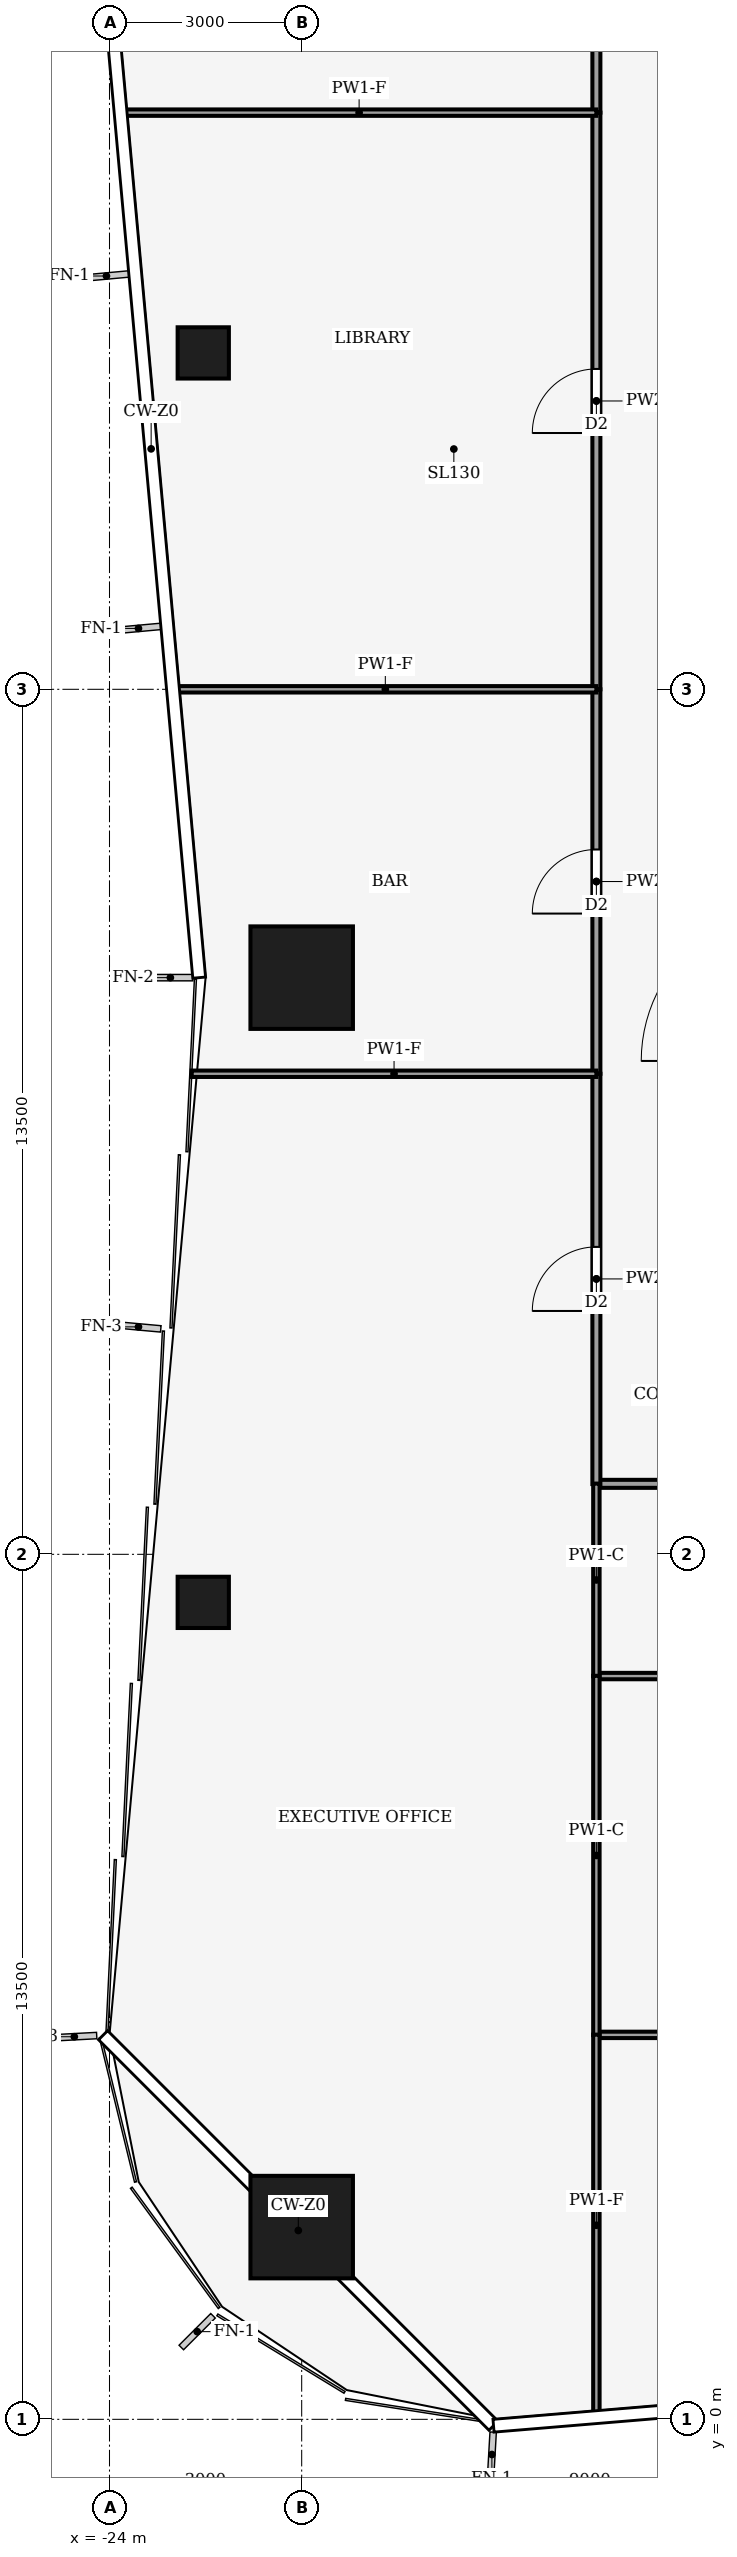
"""IFC4 building model, lengths in metres.
Left out: names, types, materials, properties, quantities, classifications, styles, units other than length and angle.
Written with IfcOpenShell. Run it as: python <this file> out.ifc"""

import sys

from ifc_helpers import new_model, si_unit, direction, frame, frame_2d, origin, origin_2d, place, context, subcontext, project, spatial, rectangle, hollow_rectangle, extrude, element, fill, save


model = new_model("IFC4")
c1 = context("Model", 3, precision=1e-05, world=origin(), true_north=direction((0.0, 1.0)))
c2 = subcontext(c1, "Body", "Model", "MODEL_VIEW")
j1 = project(units=[si_unit("LENGTHUNIT", "METRE"), si_unit("PLANEANGLEUNIT", "RADIAN")], contexts=[c1])
p1 = place(None, origin())
s1 = spatial("IfcSite", under=j1, at=p1, CompositionType="ELEMENT")
p2 = place(p1, origin())
s2 = spatial("IfcBuilding", under=s1, at=p2, CompositionType="ELEMENT")
p3 = place(p2, frame((0.0, 0.0, 14.0)))
s3 = spatial("IfcBuildingStorey", under=s2, at=p3, CompositionType="ELEMENT", Elevation=14.0)
for number, where, z_axis, x_axis in (
    (1, (-21.0, 3.0, 0.0), (0.0, 0.0, 1.0), (1.0, 0.0, 0.0)),
    (2, (-21.0, 22.5, 0.0), (0.0, 0.0, 1.0), (1.0, 0.0, 0.0)),
):
    element("IfcColumn", number, at=place(p3, frame(where, z_axis=z_axis, x_axis=x_axis)), inside=s3, PredefinedType="COLUMN", context=c2, shape_type="SweptSolid", body=[
        extrude(hollow_rectangle(XDim=1.6, YDim=1.6, WallThickness=0.09, at=origin_2d()), origin(), (0.0, 0.0, 1.0), 4.0),
    ])
for number, where, z_axis, x_axis in (
    (3, (-22.536, 12.75, 0.0), (0.0, 0.0, 1.0), (1.0, 0.0, 0.0)),
    (4, (-22.536, 32.25, 0.0), (0.0, 0.0, 1.0), (1.0, 0.0, 0.0)),
):
    element("IfcColumn", number, at=place(p3, frame(where, z_axis=z_axis, x_axis=x_axis)), inside=s3, PredefinedType="COLUMN", context=c2, shape_type="SweptSolid", body=[
        extrude(hollow_rectangle(XDim=0.8, YDim=0.8, WallThickness=0.04, at=origin_2d()), origin(), (0.0, 0.0, 1.0), 4.0),
    ])
p4 = place(p3, frame((-9.0, 14.6, 0.0), z_axis=(0.0, 0.0, 1.0), x_axis=(-1.0, 0.0, 0.0)))
e5 = element("IfcWall", 5, at=p4, inside=s3, PredefinedType="PARTITIONING", context=c2, shape_type="SweptSolid", body=[
    extrude(rectangle(XDim=7.4, YDim=0.125, at=frame_2d((3.7, 0.0))), origin(), (0.0, 0.0, 1.0), 3.29),
])
p5 = place(p4, frame((3.2, 0.0, 0.0)))
e6 = element("IfcOpeningElement", 6, at=p5, cuts=e5, PredefinedType="OPENING", context=c2, shape_type="SweptSolid", body=[
    extrude(rectangle(XDim=1.0, YDim=2.1, at=frame_2d((0.5, 1.05))), frame((0.0, 0.073, 0.0), z_axis=(0.0, -1.0, 0.0), x_axis=(1.0, 0.0, 0.0)), (0.0, 0.0, 1.0), 0.145),
])
p6 = place(p3, frame((-16.4, 14.596, 0.0), z_axis=(0.0, 0.0, 1.0), x_axis=(0.0, 1.0, 0.0)))
e7 = element("IfcWall", 7, at=p6, inside=s3, PredefinedType="PARTITIONING", context=c2, shape_type="SweptSolid", body=[
    extrude(rectangle(XDim=6.404, YDim=0.125, at=frame_2d((3.202, 0.0))), origin(), (0.0, 0.0, 1.0), 3.14),
])
p7 = place(p6, frame((2.702, 0.0, 0.0)))
e8 = element("IfcOpeningElement", 8, at=p7, cuts=e7, PredefinedType="OPENING", context=c2, shape_type="SweptSolid", body=[
    extrude(rectangle(XDim=1.0, YDim=2.1, at=frame_2d((0.5, 1.05))), frame((0.0, 0.073, 0.0), z_axis=(0.0, -1.0, 0.0), x_axis=(1.0, 0.0, 0.0)), (0.0, 0.0, 1.0), 0.145),
])
p8 = place(p3, frame((-16.4, 21.0, 0.0), z_axis=(0.0, 0.0, 1.0), x_axis=(0.0, 1.0, 0.0)))
e9 = element("IfcWall", 9, at=p8, inside=s3, PredefinedType="PARTITIONING", context=c2, shape_type="SweptSolid", body=[
    extrude(rectangle(XDim=6.0, YDim=0.125, at=frame_2d((3.0, 0.0))), origin(), (0.0, 0.0, 1.0), 3.54),
])
p9 = place(p8, frame((2.5, 0.0, 0.0)))
e10 = element("IfcOpeningElement", 10, at=p9, cuts=e9, PredefinedType="OPENING", context=c2, shape_type="SweptSolid", body=[
    extrude(rectangle(XDim=1.0, YDim=2.1, at=frame_2d((0.5, 1.05))), frame((0.0, 0.073, 0.0), z_axis=(0.0, -1.0, 0.0), x_axis=(1.0, 0.0, 0.0)), (0.0, 0.0, 1.0), 0.145),
])
p10 = place(p3, frame((-16.4, 27.0, 0.0), z_axis=(0.0, 0.0, 1.0), x_axis=(0.0, 1.0, 0.0)))
e11 = element("IfcWall", 11, at=p10, inside=s3, PredefinedType="PARTITIONING", context=c2, shape_type="SweptSolid", body=[
    extrude(rectangle(XDim=9.0, YDim=0.125, at=frame_2d((4.5, 0.0))), origin(), (0.0, 0.0, 1.0), 3.48),
])
p11 = place(p10, frame((4.0, 0.0, 0.0)))
e12 = element("IfcOpeningElement", 12, at=p11, cuts=e11, PredefinedType="OPENING", context=c2, shape_type="SweptSolid", body=[
    extrude(rectangle(XDim=1.0, YDim=2.1, at=frame_2d((0.5, 1.05))), frame((0.0, 0.073, 0.0), z_axis=(0.0, -1.0, 0.0), x_axis=(1.0, 0.0, 0.0)), (0.0, 0.0, 1.0), 0.145),
])
p12 = place(p3, frame((-16.4, 36.0, 0.0), z_axis=(0.0, 0.0, 1.0), x_axis=(0.0, 1.0, 0.0)))
e13 = element("IfcWall", 13, at=p12, inside=s3, PredefinedType="PARTITIONING", context=c2, shape_type="SweptSolid", body=[
    extrude(rectangle(XDim=5.404, YDim=0.125, at=frame_2d((2.702, 0.0))), origin(), (0.0, 0.0, 1.0), 3.14),
])
p13 = place(p12, frame((1.802, 0.0, 0.0)))
e14 = element("IfcOpeningElement", 14, at=p13, cuts=e13, PredefinedType="OPENING", context=c2, shape_type="SweptSolid", body=[
    extrude(rectangle(XDim=1.0, YDim=2.1, at=frame_2d((0.5, 1.05))), frame((0.0, 0.073, 0.0), z_axis=(0.0, -1.0, 0.0), x_axis=(1.0, 0.0, 0.0)), (0.0, 0.0, 1.0), 0.145),
])
p14 = place(p3, frame((-8.996, 11.6, 0.0), z_axis=(0.0, 0.0, 1.0), x_axis=(-1.0, 0.0, 0.0)))
e15 = element("IfcWall", 15, at=p14, inside=s3, PredefinedType="PARTITIONING", context=c2, shape_type="SweptSolid", body=[
    extrude(rectangle(XDim=7.404, YDim=0.1, at=frame_2d((3.702, 0.0))), origin(), (0.0, 0.0, 1.0), 3.29),
])
p15 = place(p14, frame((2.802, 0.0, 0.0)))
e16 = element("IfcOpeningElement", 16, at=p15, cuts=e15, PredefinedType="OPENING", context=c2, shape_type="SweptSolid", body=[
    extrude(rectangle(XDim=1.8, YDim=2.1, at=frame_2d((0.9, 1.05))), frame((0.0, 0.06, 0.0), z_axis=(0.0, -1.0, 0.0), x_axis=(1.0, 0.0, 0.0)), (0.0, 0.0, 1.0), 0.12),
])
p16 = place(p3, frame((-16.4, 14.604, 0.0), z_axis=(0.0, 0.0, 1.0), x_axis=(0.0, -1.0, 0.0)))
e17 = element("IfcWall", 17, at=p16, inside=s3, PredefinedType="PARTITIONING", context=c2, shape_type="SweptSolid", body=[
    extrude(rectangle(XDim=3.008, YDim=0.1, at=frame_2d((1.504, 0.0))), origin(), (0.0, 0.0, 1.0), 3.87),
])
p17 = place(p3, frame((-3.0, 6.0, 0.0), z_axis=(0.0, 0.0, 1.0), x_axis=(-1.0, 0.0, 0.0)))
e18 = element("IfcWall", 18, at=p17, inside=s3, PredefinedType="PARTITIONING", context=c2, shape_type="SweptSolid", body=[
    extrude(rectangle(XDim=13.4, YDim=0.1, at=frame_2d((6.7, 0.0))), origin(), (0.0, 0.0, 1.0), 3.29),
])
p18 = place(p17, frame((6.2, 0.0, 0.0)))
e19 = element("IfcOpeningElement", 19, at=p18, cuts=e18, PredefinedType="OPENING", context=c2, shape_type="SweptSolid", body=[
    extrude(rectangle(XDim=1.0, YDim=2.1, at=frame_2d((0.5, 1.05))), frame((0.0, 0.06, 0.0), z_axis=(0.0, -1.0, 0.0), x_axis=(1.0, 0.0, 0.0)), (0.0, 0.0, 1.0), 0.12),
])
p19 = place(p3, frame((-16.4, 11.604, 0.0), z_axis=(0.0, 0.0, 1.0), x_axis=(0.0, -1.0, 0.0)))
e20 = element("IfcWall", 20, at=p19, inside=s3, PredefinedType="PARTITIONING", context=c2, shape_type="SweptSolid", body=[
    extrude(rectangle(XDim=5.608, YDim=0.1, at=frame_2d((2.804, 0.0))), origin(), (0.0, 0.0, 1.0), 3.87),
])
p20 = place(p3, frame((-16.4, 6.004, 0.0), z_axis=(0.0, 0.0, 1.0), x_axis=(0.0, -1.0, 0.0)))
e21 = element("IfcWall", 21, at=p20, inside=s3, PredefinedType="PARTITIONING", context=c2, shape_type="SweptSolid", body=[
    extrude(rectangle(XDim=5.951, YDim=0.1, at=frame_2d((2.975, 0.0))), origin(), (0.0, 0.0, 1.0), 3.04),
])
p21 = place(p3, frame((-16.4, 21.0, 0.0), z_axis=(0.0, 0.0, 1.0), x_axis=(-1.0, 0.0, 0.0)))
e22 = element("IfcWall", 22, at=p21, inside=s3, PredefinedType="PARTITIONING", context=c2, shape_type="SweptSolid", body=[
    extrude(rectangle(XDim=6.316, YDim=0.1, at=frame_2d((3.158, 0.0))), origin(), (0.0, 0.0, 1.0), 3.04),
])
p22 = place(p3, frame((-16.4, 27.0, 0.0), z_axis=(0.0, 0.0, 1.0), x_axis=(-1.0, 0.0, 0.0)))
e23 = element("IfcWall", 23, at=p22, inside=s3, PredefinedType="PARTITIONING", context=c2, shape_type="SweptSolid", body=[
    extrude(rectangle(XDim=6.589, YDim=0.1, at=frame_2d((3.294, 0.0))), origin(), (0.0, 0.0, 1.0), 3.04),
])
p23 = place(p3, frame((-16.4, 36.0, 0.0), z_axis=(0.0, 0.0, 1.0), x_axis=(-1.0, 0.0, 0.0)))
e24 = element("IfcWall", 24, at=p23, inside=s3, PredefinedType="PARTITIONING", context=c2, shape_type="SweptSolid", body=[
    extrude(rectangle(XDim=7.407, YDim=0.1, at=frame_2d((3.704, 0.0))), origin(), (0.0, 0.0, 1.0), 3.04),
])
p24 = place(p7, origin())
e25 = element("IfcDoor", 25, at=p24, inside=s3, OperationType="SINGLE_SWING_RIGHT", PredefinedType="DOOR", context=c2, shape_type="SweptSolid", body=[
    extrude(rectangle(XDim=1.0, YDim=2.1, at=frame_2d((0.5, 1.05))), frame((0.0, 0.025, 0.0), z_axis=(0.0, -1.0, 0.0), x_axis=(1.0, 0.0, 0.0)), (0.0, 0.0, 1.0), 0.05),
])
fill(e8, e25)
p25 = place(p9, origin())
e26 = element("IfcDoor", 26, at=p25, inside=s3, OperationType="SINGLE_SWING_LEFT", PredefinedType="DOOR", context=c2, shape_type="SweptSolid", body=[
    extrude(rectangle(XDim=1.0, YDim=2.1, at=frame_2d((0.5, 1.05))), frame((0.0, 0.025, 0.0), z_axis=(0.0, -1.0, 0.0), x_axis=(1.0, 0.0, 0.0)), (0.0, 0.0, 1.0), 0.05),
])
fill(e10, e26)
p26 = place(p11, origin())
e27 = element("IfcDoor", 27, at=p26, inside=s3, OperationType="SINGLE_SWING_RIGHT", PredefinedType="DOOR", context=c2, shape_type="SweptSolid", body=[
    extrude(rectangle(XDim=1.0, YDim=2.1, at=frame_2d((0.5, 1.05))), frame((0.0, 0.025, 0.0), z_axis=(0.0, -1.0, 0.0), x_axis=(1.0, 0.0, 0.0)), (0.0, 0.0, 1.0), 0.05),
])
fill(e12, e27)
save(model, sys.argv[1])
